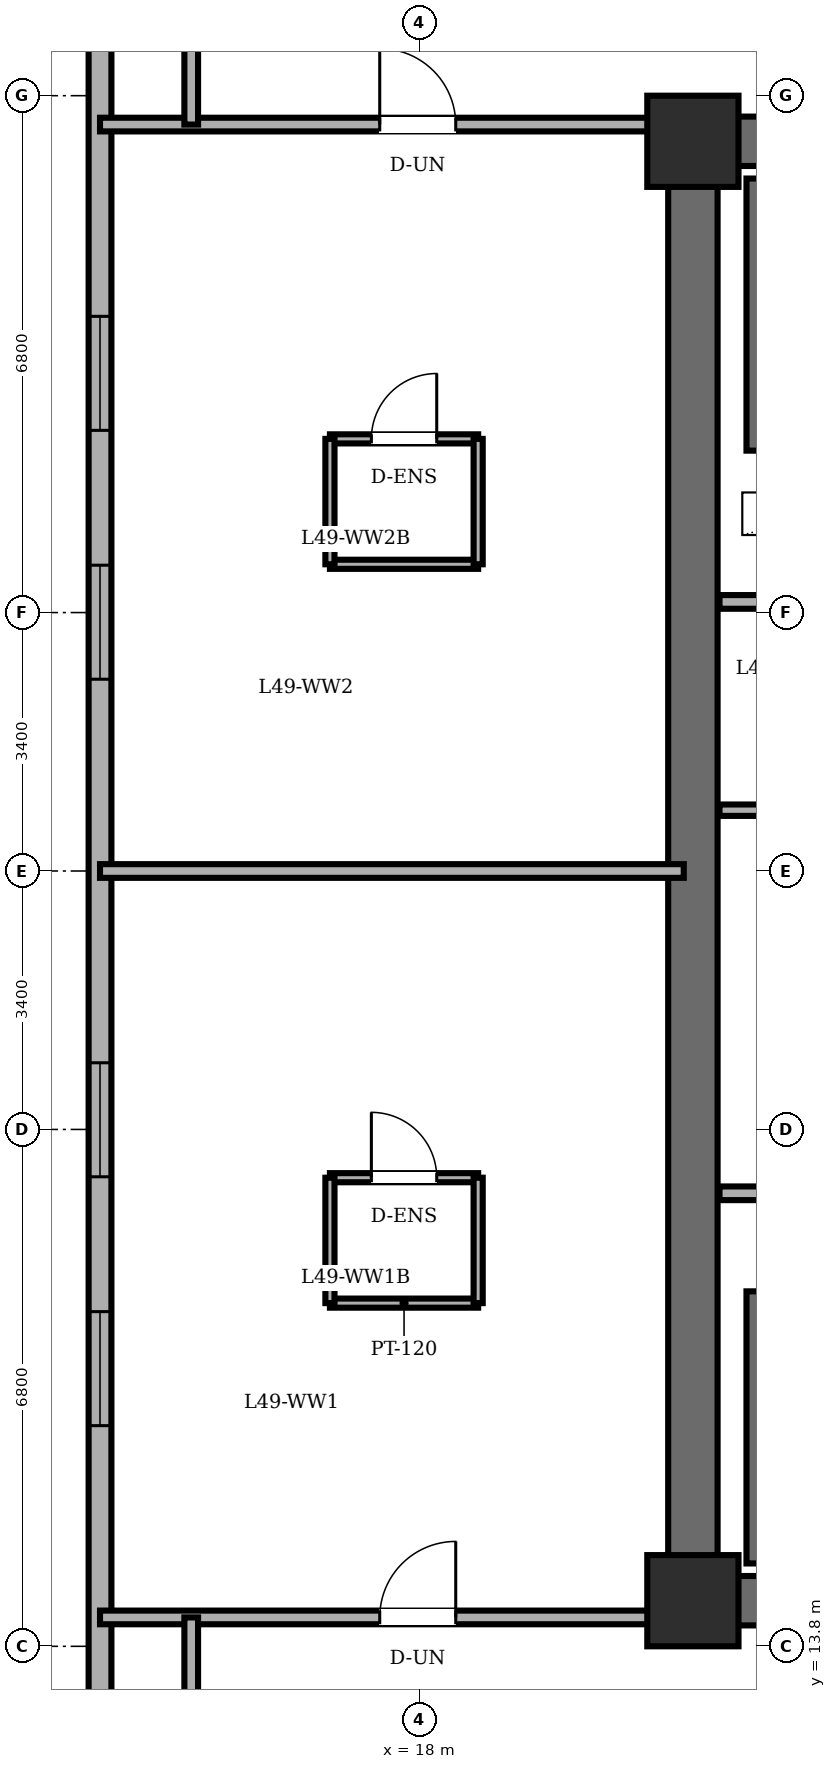
"""IFC4 building model, lengths in metres.
Left out: names, types, materials, properties, quantities, classifications, styles, units other than length and angle.
Written with IfcOpenShell. Run it as: python <this file> out.ifc"""

import sys

from ifc_helpers import new_model, si_unit, direction, frame, frame_2d, origin, origin_2d, place, context, subcontext, project, spatial, rectangle, extrude, element, fill, save


model = new_model("IFC4")
c1 = context("Model", 3, precision=1e-05, world=origin(), true_north=direction((0.0, 1.0)))
c2 = subcontext(c1, "Body", "Model", "MODEL_VIEW")
j1 = project(units=[si_unit("LENGTHUNIT", "METRE"), si_unit("PLANEANGLEUNIT", "RADIAN")], contexts=[c1])
p1 = place(None, origin())
s1 = spatial("IfcSite", under=j1, at=p1, CompositionType="ELEMENT")
p2 = place(p1, origin())
s2 = spatial("IfcBuilding", under=s1, at=p2, CompositionType="ELEMENT")
p3 = place(p2, frame((0.0, 0.0, 187.0)))
s3 = spatial("IfcBuildingStorey", under=s2, at=p3, CompositionType="ELEMENT", Elevation=187.0)
for number, where, z_axis, x_axis in (
    (1, (21.6, 14.4, 0.0), (0.0, 0.0, 1.0), (1.0, 0.0, 0.0)),
    (2, (21.6, 33.6, 0.0), (0.0, 0.0, 1.0), (1.0, 0.0, 0.0)),
):
    element("IfcColumn", number, at=place(p3, frame(where, z_axis=z_axis, x_axis=x_axis)), inside=s3, PredefinedType="COLUMN", context=c2, shape_type="SweptSolid", body=[
        extrude(rectangle(XDim=1.2, YDim=1.2, at=origin_2d()), origin(), (0.0, 0.0, 1.0), 3.6),
    ])
p4 = place(p3, frame((13.8, 36.3, 0.0), z_axis=(0.0, 0.0, 1.0), x_axis=(0.0, -1.0, 0.0)))
e3 = element("IfcWall", 3, at=p4, inside=s3, PredefinedType="SOLIDWALL", context=c2, shape_type="SweptSolid", body=[
    extrude(rectangle(XDim=24.6, YDim=0.3, at=frame_2d((12.3, 0.0))), origin(), (0.0, 0.0, 1.0), 3.36),
])
p5 = place(p4, frame((5.003, 0.0, 0.85)))
e4 = element("IfcOpeningElement", 4, at=p5, cuts=e3, PredefinedType="OPENING", context=c2, shape_type="SweptSolid", body=[
    extrude(rectangle(XDim=1.5, YDim=1.55, at=frame_2d((0.75, 0.775))), frame((0.0, 0.16, 0.0), z_axis=(0.0, -1.0, 0.0), x_axis=(1.0, 0.0, 0.0)), (0.0, 0.0, 1.0), 0.32),
])
p6 = place(p4, frame((8.277, 0.0, 0.85)))
e5 = element("IfcOpeningElement", 5, at=p6, cuts=e3, PredefinedType="OPENING", context=c2, shape_type="SweptSolid", body=[
    extrude(rectangle(XDim=1.5, YDim=1.55, at=frame_2d((0.75, 0.775))), frame((0.0, 0.16, 0.0), z_axis=(0.0, -1.0, 0.0), x_axis=(1.0, 0.0, 0.0)), (0.0, 0.0, 1.0), 0.32),
])
p7 = place(p4, frame((14.823, 0.0, 0.85)))
e6 = element("IfcOpeningElement", 6, at=p7, cuts=e3, PredefinedType="OPENING", context=c2, shape_type="SweptSolid", body=[
    extrude(rectangle(XDim=1.5, YDim=1.55, at=frame_2d((0.75, 0.775))), frame((0.0, 0.16, 0.0), z_axis=(0.0, -1.0, 0.0), x_axis=(1.0, 0.0, 0.0)), (0.0, 0.0, 1.0), 0.32),
])
p8 = place(p4, frame((18.097, 0.0, 0.85)))
e7 = element("IfcOpeningElement", 7, at=p8, cuts=e3, PredefinedType="OPENING", context=c2, shape_type="SweptSolid", body=[
    extrude(rectangle(XDim=1.5, YDim=1.55, at=frame_2d((0.75, 0.775))), frame((0.0, 0.16, 0.0), z_axis=(0.0, -1.0, 0.0), x_axis=(1.0, 0.0, 0.0)), (0.0, 0.0, 1.0), 0.32),
])
p9 = place(p3, frame((21.6, 14.4, 0.0), z_axis=(0.0, 0.0, 1.0), x_axis=(0.0, 1.0, 0.0)))
e8 = element("IfcWall", 8, at=p9, inside=s3, PredefinedType="SHEAR", context=c2, shape_type="SweptSolid", body=[
    extrude(rectangle(XDim=19.2, YDim=0.65, at=frame_2d((9.6, 0.0))), origin(), (0.0, 0.0, 1.0), 3.36),
])
for number, where, z_axis, x_axis in (
    (9, (21.6, 33.6, 0.0), (0.0, 0.0, 1.0), (1.0, 0.0, 0.0)),
    (10, (37.2, 14.4, 0.0), (0.0, 0.0, 1.0), (-1.0, 0.0, 0.0)),
):
    element("IfcWall", number, at=place(p3, frame(where, z_axis=z_axis, x_axis=x_axis)), inside=s3, PredefinedType="SHEAR", context=c2, shape_type="SweptSolid", body=[
        extrude(rectangle(XDim=15.6, YDim=0.65, at=frame_2d((7.8, 0.0))), origin(), (0.0, 0.0, 1.0), 3.36),
    ])
for number, where, z_axis, x_axis in (
    (11, (22.48, 29.53, 0.0), (0.0, 0.0, 1.0), (0.0, 1.0, 0.0)),
    (12, (22.48, 14.89, 0.0), (0.0, 0.0, 1.0), (0.0, 1.0, 0.0)),
):
    element("IfcWall", number, at=place(p3, frame(where, z_axis=z_axis, x_axis=x_axis)), inside=s3, PredefinedType="SOLIDWALL", context=c2, shape_type="SweptSolid", body=[
        extrude(rectangle(XDim=3.58, YDim=0.35, at=frame_2d((1.79, 0.0))), origin(), (0.0, 0.0, 1.0), 3.36),
    ])
p10 = place(p3, frame((21.95, 27.54, 0.0), z_axis=(0.0, 0.0, 1.0), x_axis=(1.0, 0.0, 0.0)))
e13 = element("IfcWall", 13, at=p10, inside=s3, PredefinedType="PARTITIONING", context=c2, shape_type="SweptSolid", body=[
    extrude(rectangle(XDim=10.56, YDim=0.18, at=frame_2d((5.28, 0.0))), origin(), (0.0, 0.0, 1.0), 3.36),
])
p11 = place(p3, frame((21.95, 19.76, 0.0), z_axis=(0.0, 0.0, 1.0), x_axis=(1.0, 0.0, 0.0)))
e14 = element("IfcWall", 14, at=p11, inside=s3, PredefinedType="PARTITIONING", context=c2, shape_type="SweptSolid", body=[
    extrude(rectangle(XDim=14.87, YDim=0.18, at=frame_2d((7.435, 0.0))), origin(), (0.0, 0.0, 1.0), 3.36),
])
p12 = place(p3, frame((21.95, 24.8, 0.0), z_axis=(0.0, 0.0, 1.0), x_axis=(1.0, 0.0, 0.0)))
e15 = element("IfcWall", 15, at=p12, inside=s3, PredefinedType="PARTITIONING", context=c2, shape_type="SweptSolid", body=[
    extrude(rectangle(XDim=2.51, YDim=0.15, at=frame_2d((1.255, 0.0))), origin(), (0.0, 0.0, 1.0), 3.36),
])
p13 = place(p3, frame((16.825, 19.965, 0.0), z_axis=(0.0, 0.0, 1.0), x_axis=(1.0, 0.0, 0.0)))
e16 = element("IfcWall", 16, at=p13, inside=s3, PredefinedType="PARTITIONING", context=c2, shape_type="SweptSolid", body=[
    extrude(rectangle(XDim=1.95, YDim=0.12, at=frame_2d((0.975, 0.0))), origin(), (0.0, 0.0, 1.0), 3.36),
])
p14 = place(p13, frame((0.545, 0.0, 0.0)))
e17 = element("IfcOpeningElement", 17, at=p14, cuts=e16, PredefinedType="OPENING", context=c2, shape_type="SweptSolid", body=[
    extrude(rectangle(XDim=0.86, YDim=2.1, at=frame_2d((0.43, 1.05))), frame((0.0, 0.07, 0.0), z_axis=(0.0, -1.0, 0.0), x_axis=(1.0, 0.0, 0.0)), (0.0, 0.0, 1.0), 0.14),
])
p15 = place(p3, frame((18.775, 18.315, 0.0), z_axis=(0.0, 0.0, 1.0), x_axis=(-1.0, 0.0, 0.0)))
e18 = element("IfcWall", 18, at=p15, inside=s3, PredefinedType="PARTITIONING", context=c2, shape_type="SweptSolid", body=[
    extrude(rectangle(XDim=1.95, YDim=0.12, at=frame_2d((0.975, 0.0))), origin(), (0.0, 0.0, 1.0), 3.36),
])
for number, where, z_axis, x_axis in (
    (19, (16.825, 19.965, 0.0), (0.0, 0.0, 1.0), (0.0, -1.0, 0.0)),
    (20, (18.775, 18.315, 0.0), (0.0, 0.0, 1.0), (0.0, 1.0, 0.0)),
):
    element("IfcWall", number, at=place(p3, frame(where, z_axis=z_axis, x_axis=x_axis)), inside=s3, PredefinedType="PARTITIONING", context=c2, shape_type="SweptSolid", body=[
        extrude(rectangle(XDim=1.65, YDim=0.12, at=frame_2d((0.825, 0.0))), origin(), (0.0, 0.0, 1.0), 3.36),
    ])
p16 = place(p3, frame((16.825, 29.685, 0.0), z_axis=(0.0, 0.0, 1.0), x_axis=(1.0, 0.0, 0.0)))
e21 = element("IfcWall", 21, at=p16, inside=s3, PredefinedType="PARTITIONING", context=c2, shape_type="SweptSolid", body=[
    extrude(rectangle(XDim=1.95, YDim=0.12, at=frame_2d((0.975, 0.0))), origin(), (0.0, 0.0, 1.0), 3.36),
])
p17 = place(p16, frame((0.545, 0.0, 0.0)))
e22 = element("IfcOpeningElement", 22, at=p17, cuts=e21, PredefinedType="OPENING", context=c2, shape_type="SweptSolid", body=[
    extrude(rectangle(XDim=0.86, YDim=2.1, at=frame_2d((0.43, 1.05))), frame((0.0, 0.07, 0.0), z_axis=(0.0, -1.0, 0.0), x_axis=(1.0, 0.0, 0.0)), (0.0, 0.0, 1.0), 0.14),
])
p18 = place(p3, frame((18.775, 28.035, 0.0), z_axis=(0.0, 0.0, 1.0), x_axis=(-1.0, 0.0, 0.0)))
e23 = element("IfcWall", 23, at=p18, inside=s3, PredefinedType="PARTITIONING", context=c2, shape_type="SweptSolid", body=[
    extrude(rectangle(XDim=1.95, YDim=0.12, at=frame_2d((0.975, 0.0))), origin(), (0.0, 0.0, 1.0), 3.36),
])
for number, where, z_axis, x_axis in (
    (24, (16.825, 29.685, 0.0), (0.0, 0.0, 1.0), (0.0, -1.0, 0.0)),
    (25, (18.775, 28.035, 0.0), (0.0, 0.0, 1.0), (0.0, 1.0, 0.0)),
):
    element("IfcWall", number, at=place(p3, frame(where, z_axis=z_axis, x_axis=x_axis)), inside=s3, PredefinedType="PARTITIONING", context=c2, shape_type="SweptSolid", body=[
        extrude(rectangle(XDim=1.65, YDim=0.12, at=frame_2d((0.825, 0.0))), origin(), (0.0, 0.0, 1.0), 3.36),
    ])
p19 = place(p3, frame((13.8, 14.18, 0.0), z_axis=(0.0, 0.0, 1.0), x_axis=(1.0, 0.0, 0.0)))
e26 = element("IfcWall", 26, at=p19, inside=s3, PredefinedType="PARTITIONING", context=c2, shape_type="SweptSolid", body=[
    extrude(rectangle(XDim=7.68, YDim=0.18, at=frame_2d((3.84, 0.0))), origin(), (0.0, 0.0, 1.0), 3.36),
])
p20 = place(p19, frame((3.68, 0.0, 0.0)))
e27 = element("IfcOpeningElement", 27, at=p20, cuts=e26, PredefinedType="OPENING", context=c2, shape_type="SweptSolid", body=[
    extrude(rectangle(XDim=1.0, YDim=2.15, at=frame_2d((0.5, 1.075))), frame((0.0, 0.1, 0.0), z_axis=(0.0, -1.0, 0.0), x_axis=(1.0, 0.0, 0.0)), (0.0, 0.0, 1.0), 0.2),
])
p21 = place(p3, frame((13.8, 24.0, 0.0), z_axis=(0.0, 0.0, 1.0), x_axis=(1.0, 0.0, 0.0)))
e28 = element("IfcWall", 28, at=p21, inside=s3, PredefinedType="PARTITIONING", context=c2, shape_type="SweptSolid", body=[
    extrude(rectangle(XDim=7.68, YDim=0.18, at=frame_2d((3.84, 0.0))), origin(), (0.0, 0.0, 1.0), 3.36),
])
p22 = place(p3, frame((13.8, 33.82, 0.0), z_axis=(0.0, 0.0, 1.0), x_axis=(1.0, 0.0, 0.0)))
e29 = element("IfcWall", 29, at=p22, inside=s3, PredefinedType="PARTITIONING", context=c2, shape_type="SweptSolid", body=[
    extrude(rectangle(XDim=7.68, YDim=0.18, at=frame_2d((3.84, 0.0))), origin(), (0.0, 0.0, 1.0), 3.36),
])
p23 = place(p22, frame((3.68, 0.0, 0.0)))
e30 = element("IfcOpeningElement", 30, at=p23, cuts=e29, PredefinedType="OPENING", context=c2, shape_type="SweptSolid", body=[
    extrude(rectangle(XDim=1.0, YDim=2.15, at=frame_2d((0.5, 1.075))), frame((0.0, 0.1, 0.0), z_axis=(0.0, -1.0, 0.0), x_axis=(1.0, 0.0, 0.0)), (0.0, 0.0, 1.0), 0.2),
])
for number, where, z_axis, x_axis in (
    (31, (15.0, 8.487, 0.0), (0.0, 0.0, 1.0), (0.0, 1.0, 0.0)),
    (32, (15.0, 33.82, 0.0), (0.0, 0.0, 1.0), (0.0, 1.0, 0.0)),
):
    element("IfcWall", number, at=place(p3, frame(where, z_axis=z_axis, x_axis=x_axis)), inside=s3, PredefinedType="PARTITIONING", context=c2, shape_type="SweptSolid", body=[
        extrude(rectangle(XDim=5.693, YDim=0.18, at=frame_2d((2.846, 0.0))), origin(), (0.0, 0.0, 1.0), 3.36),
    ])
p24 = place(p5, origin())
e33 = element("IfcWindow", 33, at=p24, inside=s3, PartitioningType="DOUBLE_PANEL_VERTICAL", PredefinedType="WINDOW", context=c2, shape_type="SweptSolid", body=[
    extrude(rectangle(XDim=1.5, YDim=1.55, at=frame_2d((0.75, 0.775))), frame((0.0, 0.03, 0.0), z_axis=(0.0, -1.0, 0.0), x_axis=(1.0, 0.0, 0.0)), (0.0, 0.0, 1.0), 0.06),
])
fill(e4, e33)
p25 = place(p6, origin())
e34 = element("IfcWindow", 34, at=p25, inside=s3, PartitioningType="DOUBLE_PANEL_VERTICAL", PredefinedType="WINDOW", context=c2, shape_type="SweptSolid", body=[
    extrude(rectangle(XDim=1.5, YDim=1.55, at=frame_2d((0.75, 0.775))), frame((0.0, 0.03, 0.0), z_axis=(0.0, -1.0, 0.0), x_axis=(1.0, 0.0, 0.0)), (0.0, 0.0, 1.0), 0.06),
])
fill(e5, e34)
p26 = place(p7, origin())
e35 = element("IfcWindow", 35, at=p26, inside=s3, PartitioningType="DOUBLE_PANEL_VERTICAL", PredefinedType="WINDOW", context=c2, shape_type="SweptSolid", body=[
    extrude(rectangle(XDim=1.5, YDim=1.55, at=frame_2d((0.75, 0.775))), frame((0.0, 0.03, 0.0), z_axis=(0.0, -1.0, 0.0), x_axis=(1.0, 0.0, 0.0)), (0.0, 0.0, 1.0), 0.06),
])
fill(e6, e35)
p27 = place(p8, origin())
e36 = element("IfcWindow", 36, at=p27, inside=s3, PartitioningType="DOUBLE_PANEL_VERTICAL", PredefinedType="WINDOW", context=c2, shape_type="SweptSolid", body=[
    extrude(rectangle(XDim=1.5, YDim=1.55, at=frame_2d((0.75, 0.775))), frame((0.0, 0.03, 0.0), z_axis=(0.0, -1.0, 0.0), x_axis=(1.0, 0.0, 0.0)), (0.0, 0.0, 1.0), 0.06),
])
fill(e7, e36)
p28 = place(p14, origin())
e37 = element("IfcDoor", 37, at=p28, inside=s3, OperationType="SINGLE_SWING_LEFT", PredefinedType="DOOR", context=c2, shape_type="SweptSolid", body=[
    extrude(rectangle(XDim=0.86, YDim=2.1, at=frame_2d((0.43, 1.05))), frame((0.0, 0.025, 0.0), z_axis=(0.0, -1.0, 0.0), x_axis=(1.0, 0.0, 0.0)), (0.0, 0.0, 1.0), 0.05),
])
fill(e17, e37)
p29 = place(p17, origin())
e38 = element("IfcDoor", 38, at=p29, inside=s3, OperationType="SINGLE_SWING_RIGHT", PredefinedType="DOOR", context=c2, shape_type="SweptSolid", body=[
    extrude(rectangle(XDim=0.86, YDim=2.1, at=frame_2d((0.43, 1.05))), frame((0.0, 0.025, 0.0), z_axis=(0.0, -1.0, 0.0), x_axis=(1.0, 0.0, 0.0)), (0.0, 0.0, 1.0), 0.05),
])
fill(e22, e38)
p30 = place(p20, origin())
e39 = element("IfcDoor", 39, at=p30, inside=s3, OperationType="SINGLE_SWING_RIGHT", PredefinedType="DOOR", context=c2, shape_type="SweptSolid", body=[
    extrude(rectangle(XDim=1.0, YDim=2.15, at=frame_2d((0.5, 1.075))), frame((0.0, 0.025, 0.0), z_axis=(0.0, -1.0, 0.0), x_axis=(1.0, 0.0, 0.0)), (0.0, 0.0, 1.0), 0.05),
])
fill(e27, e39)
p31 = place(p23, origin())
e40 = element("IfcDoor", 40, at=p31, inside=s3, OperationType="SINGLE_SWING_LEFT", PredefinedType="DOOR", context=c2, shape_type="SweptSolid", body=[
    extrude(rectangle(XDim=1.0, YDim=2.15, at=frame_2d((0.5, 1.075))), frame((0.0, 0.025, 0.0), z_axis=(0.0, -1.0, 0.0), x_axis=(1.0, 0.0, 0.0)), (0.0, 0.0, 1.0), 0.05),
])
fill(e30, e40)
save(model, sys.argv[1])
